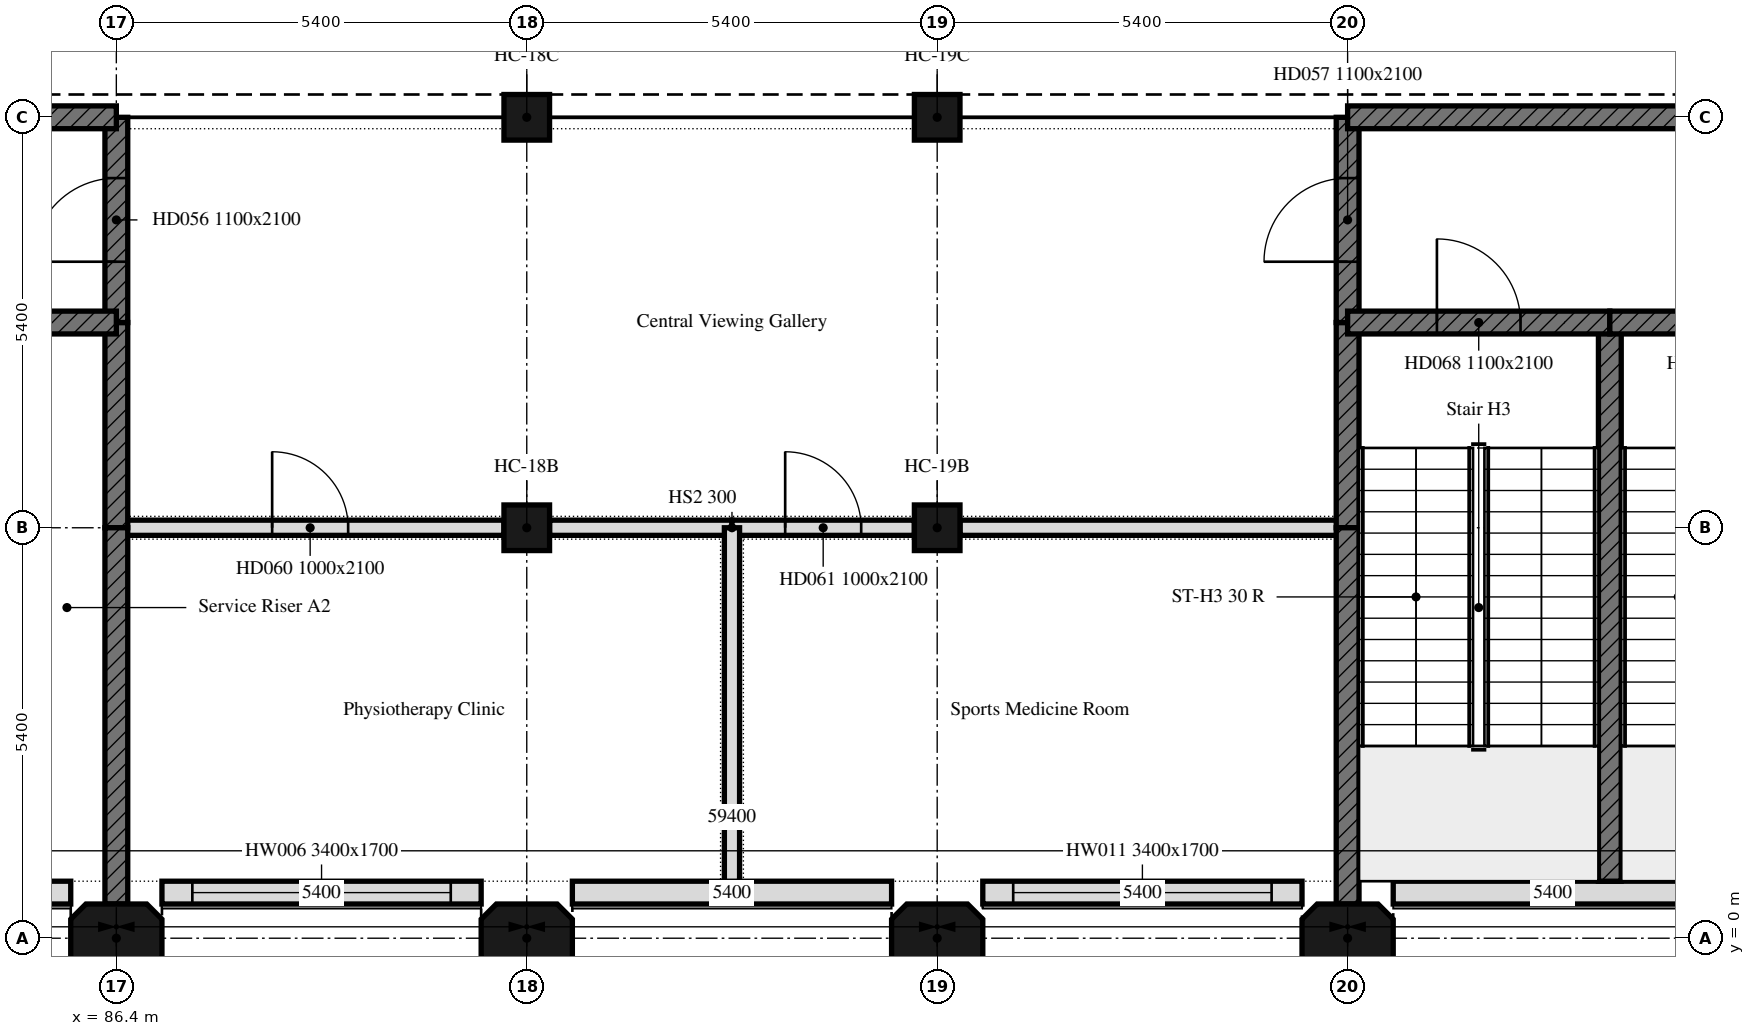
"""IFC4 building model, lengths in metres.
Left out: names, types, materials, properties, quantities, classifications, styles, units other than length and angle.
Written with IfcOpenShell. Run it as: python <this file> out.ifc"""

import sys

from ifc_helpers import new_model, si_unit, direction, frame, frame_2d, origin, origin_2d, place, context, subcontext, project, spatial, polyline, rectangle, outline, extrude, element, fill, save


model = new_model("IFC4")
c1 = context("Model", 3, precision=1e-05, world=origin(), true_north=direction((0.0, 1.0)))
c2 = subcontext(c1, "Body", "Model", "MODEL_VIEW")
j1 = project(units=[si_unit("LENGTHUNIT", "METRE"), si_unit("PLANEANGLEUNIT", "RADIAN")], contexts=[c1])
p1 = place(None, origin())
s1 = spatial("IfcSite", under=j1, at=p1, CompositionType="ELEMENT")
p2 = place(p1, origin())
s2 = spatial("IfcBuilding", under=s1, at=p2, CompositionType="ELEMENT")
p3 = place(p2, frame((0.0, 0.0, 14.4)))
s3 = spatial("IfcBuildingStorey", under=s2, at=p3, CompositionType="ELEMENT", Elevation=14.4)
for number, where, z_axis, x_axis in (
    (1, (86.4, 0.0, 0.0), (0.0, 0.0, 1.0), (1.0, 0.0, 0.0)),
    (2, (91.8, 0.0, 0.0), (0.0, 0.0, 1.0), (1.0, 0.0, 0.0)),
):
    element("IfcColumn", number, at=place(p3, frame(where, z_axis=z_axis, x_axis=x_axis)), inside=s3, PredefinedType="COLUMN", context=c2, shape_type="SweptSolid", body=[
        extrude(outline(polyline([(-0.4, -0.45), (0.4, -0.45), (0.6, -0.25), (0.6, 0.25), (0.4, 0.45), (-0.4, 0.45), (-0.6, 0.25), (-0.6, -0.25), (-0.4, -0.45)])), origin(), (0.0, 0.0, 1.0), 5.1),
    ])
for number, where, z_axis, x_axis in (
    (3, (91.8, 5.4, 0.0), (0.0, 0.0, 1.0), (1.0, 0.0, 0.0)),
    (4, (91.8, 10.8, 0.0), (0.0, 0.0, 1.0), (1.0, 0.0, 0.0)),
):
    element("IfcColumn", number, at=place(p3, frame(where, z_axis=z_axis, x_axis=x_axis)), inside=s3, PredefinedType="COLUMN", context=c2, shape_type="SweptSolid", body=[
        extrude(rectangle(XDim=0.6, YDim=0.6, at=origin_2d()), origin(), (0.0, 0.0, 1.0), 5.1),
    ])
p4 = place(p3, frame((97.2, 0.0, 0.0), z_axis=(0.0, 0.0, 1.0), x_axis=(1.0, 0.0, 0.0)))
e5 = element("IfcColumn", 5, at=p4, inside=s3, PredefinedType="COLUMN", context=c2, shape_type="SweptSolid", body=[
    extrude(outline(polyline([(-0.4, -0.45), (0.4, -0.45), (0.6, -0.25), (0.6, 0.25), (0.4, 0.45), (-0.4, 0.45), (-0.6, 0.25), (-0.6, -0.25), (-0.4, -0.45)])), origin(), (0.0, 0.0, 1.0), 5.1),
])
for number, where, z_axis, x_axis in (
    (6, (97.2, 5.4, 0.0), (0.0, 0.0, 1.0), (1.0, 0.0, 0.0)),
    (7, (97.2, 10.8, 0.0), (0.0, 0.0, 1.0), (1.0, 0.0, 0.0)),
):
    element("IfcColumn", number, at=place(p3, frame(where, z_axis=z_axis, x_axis=x_axis)), inside=s3, PredefinedType="COLUMN", context=c2, shape_type="SweptSolid", body=[
        extrude(rectangle(XDim=0.6, YDim=0.6, at=origin_2d()), origin(), (0.0, 0.0, 1.0), 5.1),
    ])
p5 = place(p3, frame((102.6, 0.0, 0.0), z_axis=(0.0, 0.0, 1.0), x_axis=(1.0, 0.0, 0.0)))
e8 = element("IfcColumn", 8, at=p5, inside=s3, PredefinedType="COLUMN", context=c2, shape_type="SweptSolid", body=[
    extrude(outline(polyline([(-0.4, -0.45), (0.4, -0.45), (0.6, -0.25), (0.6, 0.25), (0.4, 0.45), (-0.4, 0.45), (-0.6, 0.25), (-0.6, -0.25), (-0.4, -0.45)])), origin(), (0.0, 0.0, 1.0), 5.1),
])
p6 = place(p3, frame((81.6, 0.6, 0.0), z_axis=(0.0, 0.0, 1.0), x_axis=(1.0, 0.0, 0.0)))
e9 = element("IfcWall", 9, at=p6, inside=s3, PredefinedType="SOLIDWALL", context=c2, shape_type="SweptSolid", body=[
    extrude(rectangle(XDim=4.2, YDim=0.3, at=frame_2d((2.1, 0.0))), origin(), (0.0, 0.0, 1.0), 5.1),
])
p7 = place(p3, frame((87.0, 0.6, 0.0), z_axis=(0.0, 0.0, 1.0), x_axis=(1.0, 0.0, 0.0)))
e10 = element("IfcWall", 10, at=p7, inside=s3, PredefinedType="SOLIDWALL", context=c2, shape_type="SweptSolid", body=[
    extrude(rectangle(XDim=4.2, YDim=0.3, at=frame_2d((2.1, 0.0))), origin(), (0.0, 0.0, 1.0), 5.1),
])
p8 = place(p7, frame((0.4, 0.0, 0.9)))
e11 = element("IfcOpeningElement", 11, at=p8, cuts=e10, PredefinedType="OPENING", context=c2, shape_type="SweptSolid", body=[
    extrude(rectangle(XDim=3.4, YDim=1.7, at=frame_2d((1.7, 0.85))), frame((0.0, 0.15, 0.0), z_axis=(0.0, -1.0, 0.0), x_axis=(1.0, 0.0, 0.0)), (0.0, 0.0, 1.0), 0.3),
])
p9 = place(p3, frame((92.4, 0.6, 0.0), z_axis=(0.0, 0.0, 1.0), x_axis=(1.0, 0.0, 0.0)))
e12 = element("IfcWall", 12, at=p9, inside=s3, PredefinedType="SOLIDWALL", context=c2, shape_type="SweptSolid", body=[
    extrude(rectangle(XDim=4.2, YDim=0.3, at=frame_2d((2.1, 0.0))), origin(), (0.0, 0.0, 1.0), 5.1),
])
p10 = place(p3, frame((97.8, 0.6, 0.0), z_axis=(0.0, 0.0, 1.0), x_axis=(1.0, 0.0, 0.0)))
e13 = element("IfcWall", 13, at=p10, inside=s3, PredefinedType="SOLIDWALL", context=c2, shape_type="SweptSolid", body=[
    extrude(rectangle(XDim=4.2, YDim=0.3, at=frame_2d((2.1, 0.0))), origin(), (0.0, 0.0, 1.0), 5.1),
])
p11 = place(p10, frame((0.4, 0.0, 0.9)))
e14 = element("IfcOpeningElement", 14, at=p11, cuts=e13, PredefinedType="OPENING", context=c2, shape_type="SweptSolid", body=[
    extrude(rectangle(XDim=3.4, YDim=1.7, at=frame_2d((1.7, 0.85))), frame((0.0, 0.15, 0.0), z_axis=(0.0, -1.0, 0.0), x_axis=(1.0, 0.0, 0.0)), (0.0, 0.0, 1.0), 0.3),
])
p12 = place(p3, frame((103.2, 0.6, 0.0), z_axis=(0.0, 0.0, 1.0), x_axis=(1.0, 0.0, 0.0)))
e15 = element("IfcWall", 15, at=p12, inside=s3, PredefinedType="SOLIDWALL", context=c2, shape_type="SweptSolid", body=[
    extrude(rectangle(XDim=4.2, YDim=0.3, at=frame_2d((2.1, 0.0))), origin(), (0.0, 0.0, 1.0), 5.1),
])
p13 = place(p3, frame((86.4, 5.4, 0.0), z_axis=(0.0, 0.0, 1.0), x_axis=(1.0, 0.0, 0.0)))
e16 = element("IfcWall", 16, at=p13, inside=s3, PredefinedType="PARTITIONING", context=c2, shape_type="SweptSolid", body=[
    extrude(rectangle(XDim=5.1, YDim=0.2, at=frame_2d((2.55, 0.0))), origin(), (0.0, 0.0, 1.0), 5.1),
])
p14 = place(p13, frame((2.05, 0.0, 0.0)))
e17 = element("IfcOpeningElement", 17, at=p14, cuts=e16, PredefinedType="OPENING", context=c2, shape_type="SweptSolid", body=[
    extrude(rectangle(XDim=1.0, YDim=2.1, at=frame_2d((0.5, 1.05))), frame((0.0, 0.1, 0.0), z_axis=(0.0, -1.0, 0.0), x_axis=(1.0, 0.0, 0.0)), (0.0, 0.0, 1.0), 0.2),
])
p15 = place(p3, frame((92.1, 5.4, 0.0), z_axis=(0.0, 0.0, 1.0), x_axis=(1.0, 0.0, 0.0)))
e18 = element("IfcWall", 18, at=p15, inside=s3, PredefinedType="PARTITIONING", context=c2, shape_type="SweptSolid", body=[
    extrude(rectangle(XDim=2.4, YDim=0.2, at=frame_2d((1.2, 0.0))), origin(), (0.0, 0.0, 1.0), 5.1),
])
p16 = place(p3, frame((94.5, 5.4, 0.0), z_axis=(0.0, 0.0, 1.0), x_axis=(1.0, 0.0, 0.0)))
e19 = element("IfcWall", 19, at=p16, inside=s3, PredefinedType="PARTITIONING", context=c2, shape_type="SweptSolid", body=[
    extrude(rectangle(XDim=2.4, YDim=0.2, at=frame_2d((1.2, 0.0))), origin(), (0.0, 0.0, 1.0), 5.1),
])
p17 = place(p16, frame((0.7, 0.0, 0.0)))
e20 = element("IfcOpeningElement", 20, at=p17, cuts=e19, PredefinedType="OPENING", context=c2, shape_type="SweptSolid", body=[
    extrude(rectangle(XDim=1.0, YDim=2.1, at=frame_2d((0.5, 1.05))), frame((0.0, 0.1, 0.0), z_axis=(0.0, -1.0, 0.0), x_axis=(1.0, 0.0, 0.0)), (0.0, 0.0, 1.0), 0.2),
])
p18 = place(p3, frame((97.5, 5.4, 0.0), z_axis=(0.0, 0.0, 1.0), x_axis=(1.0, 0.0, 0.0)))
e21 = element("IfcWall", 21, at=p18, inside=s3, PredefinedType="PARTITIONING", context=c2, shape_type="SweptSolid", body=[
    extrude(rectangle(XDim=5.1, YDim=0.2, at=frame_2d((2.55, 0.0))), origin(), (0.0, 0.0, 1.0), 5.1),
])
p19 = place(p3, frame((86.4, 5.4, 0.0), z_axis=(0.0, 0.0, 1.0), x_axis=(0.0, 1.0, 0.0)))
e22 = element("IfcWall", 22, at=p19, inside=s3, PredefinedType="SHEAR", context=c2, shape_type="SweptSolid", body=[
    extrude(rectangle(XDim=2.7, YDim=0.3, at=frame_2d((1.35, 0.0))), origin(), (0.0, 0.0, 1.0), 5.1),
])
p20 = place(p3, frame((86.4, 8.1, 0.0), z_axis=(0.0, 0.0, 1.0), x_axis=(0.0, 1.0, 0.0)))
e23 = element("IfcWall", 23, at=p20, inside=s3, PredefinedType="SHEAR", context=c2, shape_type="SweptSolid", body=[
    extrude(rectangle(XDim=2.7, YDim=0.3, at=frame_2d((1.35, 0.0))), origin(), (0.0, 0.0, 1.0), 5.1),
])
p21 = place(p20, frame((0.8, 0.0, 0.0)))
e24 = element("IfcOpeningElement", 24, at=p21, cuts=e23, PredefinedType="OPENING", context=c2, shape_type="SweptSolid", body=[
    extrude(rectangle(XDim=1.1, YDim=2.1, at=frame_2d((0.55, 1.05))), frame((0.0, 0.15, 0.0), z_axis=(0.0, -1.0, 0.0), x_axis=(1.0, 0.0, 0.0)), (0.0, 0.0, 1.0), 0.3),
])
p22 = place(p3, frame((102.6, 5.4, 0.0), z_axis=(0.0, 0.0, 1.0), x_axis=(0.0, 1.0, 0.0)))
e25 = element("IfcWall", 25, at=p22, inside=s3, PredefinedType="SHEAR", context=c2, shape_type="SweptSolid", body=[
    extrude(rectangle(XDim=2.7, YDim=0.3, at=frame_2d((1.35, 0.0))), origin(), (0.0, 0.0, 1.0), 5.1),
])
p23 = place(p3, frame((102.6, 8.1, 0.0), z_axis=(0.0, 0.0, 1.0), x_axis=(0.0, 1.0, 0.0)))
e26 = element("IfcWall", 26, at=p23, inside=s3, PredefinedType="SHEAR", context=c2, shape_type="SweptSolid", body=[
    extrude(rectangle(XDim=2.7, YDim=0.3, at=frame_2d((1.35, 0.0))), origin(), (0.0, 0.0, 1.0), 5.1),
])
p24 = place(p23, frame((0.8, 0.0, 0.0)))
e27 = element("IfcOpeningElement", 27, at=p24, cuts=e26, PredefinedType="OPENING", context=c2, shape_type="SweptSolid", body=[
    extrude(rectangle(XDim=1.1, YDim=2.1, at=frame_2d((0.55, 1.05))), frame((0.0, 0.15, 0.0), z_axis=(0.0, -1.0, 0.0), x_axis=(1.0, 0.0, 0.0)), (0.0, 0.0, 1.0), 0.3),
])
p25 = place(p3, frame((94.5, 0.75, 0.0), z_axis=(0.0, 0.0, 1.0), x_axis=(0.0, 1.0, 0.0)))
e28 = element("IfcWall", 28, at=p25, inside=s3, PredefinedType="PARTITIONING", context=c2, shape_type="SweptSolid", body=[
    extrude(rectangle(XDim=4.65, YDim=0.2, at=frame_2d((2.325, 0.0))), origin(), (0.0, 0.0, 1.0), 5.1),
])
for number, where, z_axis, x_axis in (
    (29, (86.4, 0.45, 0.0), (0.0, 0.0, 1.0), (0.0, 1.0, 0.0)),
    (30, (102.6, 0.45, 0.0), (0.0, 0.0, 1.0), (0.0, 1.0, 0.0)),
):
    element("IfcWall", number, at=place(p3, frame(where, z_axis=z_axis, x_axis=x_axis)), inside=s3, PredefinedType="SHEAR", context=c2, shape_type="SweptSolid", body=[
        extrude(rectangle(XDim=4.95, YDim=0.3, at=frame_2d((2.475, 0.0))), origin(), (0.0, 0.0, 1.0), 5.1),
    ])
p26 = place(p3, frame((85.1, 8.1, 0.0), z_axis=(0.0, 0.0, 1.0), x_axis=(1.0, 0.0, 0.0)))
e31 = element("IfcWall", 31, at=p26, inside=s3, PredefinedType="SHEAR", context=c2, shape_type="SweptSolid", body=[
    extrude(rectangle(XDim=1.3, YDim=0.3, at=frame_2d((0.65, 0.0))), origin(), (0.0, 0.0, 1.0), 5.1),
])
p27 = place(p3, frame((81.0, 10.8, 0.0), z_axis=(0.0, 0.0, 1.0), x_axis=(1.0, 0.0, 0.0)))
e32 = element("IfcWall", 32, at=p27, inside=s3, PredefinedType="SHEAR", context=c2, shape_type="SweptSolid", body=[
    extrude(rectangle(XDim=5.4, YDim=0.3, at=frame_2d((2.7, 0.0))), origin(), (0.0, 0.0, 1.0), 5.1),
])
p28 = place(p3, frame((106.05, 0.75, 0.0), z_axis=(0.0, 0.0, 1.0), x_axis=(0.0, 1.0, 0.0)))
e33 = element("IfcWall", 33, at=p28, inside=s3, PredefinedType="SHEAR", context=c2, shape_type="SweptSolid", body=[
    extrude(rectangle(XDim=7.35, YDim=0.3, at=frame_2d((3.675, 0.0))), origin(), (0.0, 0.0, 1.0), 5.1),
])
p29 = place(p3, frame((102.6, 8.1, 0.0), z_axis=(0.0, 0.0, 1.0), x_axis=(1.0, 0.0, 0.0)))
e34 = element("IfcWall", 34, at=p29, inside=s3, PredefinedType="SHEAR", context=c2, shape_type="SweptSolid", body=[
    extrude(rectangle(XDim=3.45, YDim=0.3, at=frame_2d((1.725, 0.0))), origin(), (0.0, 0.0, 1.0), 5.1),
])
p30 = place(p29, frame((1.175, 0.0, 0.0)))
e35 = element("IfcOpeningElement", 35, at=p30, cuts=e34, PredefinedType="OPENING", context=c2, shape_type="SweptSolid", body=[
    extrude(rectangle(XDim=1.1, YDim=2.1, at=frame_2d((0.55, 1.05))), frame((0.0, 0.15, 0.0), z_axis=(0.0, -1.0, 0.0), x_axis=(1.0, 0.0, 0.0)), (0.0, 0.0, 1.0), 0.3),
])
p31 = place(p3, frame((106.05, 8.1, 0.0), z_axis=(0.0, 0.0, 1.0), x_axis=(1.0, 0.0, 0.0)))
e36 = element("IfcWall", 36, at=p31, inside=s3, PredefinedType="SHEAR", context=c2, shape_type="SweptSolid", body=[
    extrude(rectangle(XDim=3.45, YDim=0.3, at=frame_2d((1.725, 0.0))), origin(), (0.0, 0.0, 1.0), 5.1),
])
p32 = place(p31, frame((1.175, 0.0, 0.0)))
e37 = element("IfcOpeningElement", 37, at=p32, cuts=e36, PredefinedType="OPENING", context=c2, shape_type="SweptSolid", body=[
    extrude(rectangle(XDim=1.1, YDim=2.1, at=frame_2d((0.55, 1.05))), frame((0.0, 0.15, 0.0), z_axis=(0.0, -1.0, 0.0), x_axis=(1.0, 0.0, 0.0)), (0.0, 0.0, 1.0), 0.3),
])
p33 = place(p3, frame((102.6, 10.8, 0.0), z_axis=(0.0, 0.0, 1.0), x_axis=(1.0, 0.0, 0.0)))
e38 = element("IfcWall", 38, at=p33, inside=s3, PredefinedType="SHEAR", context=c2, shape_type="SweptSolid", body=[
    extrude(rectangle(XDim=10.8, YDim=0.3, at=frame_2d((5.4, 0.0))), origin(), (0.0, 0.0, 1.0), 5.1),
])
p34 = place(p8, origin())
e39 = element("IfcWindow", 39, at=p34, inside=s3, PartitioningType="SINGLE_PANEL", PredefinedType="WINDOW", context=c2, shape_type="SweptSolid", body=[
    extrude(rectangle(XDim=3.4, YDim=1.7, at=frame_2d((1.7, 0.85))), frame((0.0, 0.03, 0.0), z_axis=(0.0, -1.0, 0.0), x_axis=(1.0, 0.0, 0.0)), (0.0, 0.0, 1.0), 0.06),
])
fill(e11, e39)
p35 = place(p11, origin())
e40 = element("IfcWindow", 40, at=p35, inside=s3, PartitioningType="SINGLE_PANEL", PredefinedType="WINDOW", context=c2, shape_type="SweptSolid", body=[
    extrude(rectangle(XDim=3.4, YDim=1.7, at=frame_2d((1.7, 0.85))), frame((0.0, 0.03, 0.0), z_axis=(0.0, -1.0, 0.0), x_axis=(1.0, 0.0, 0.0)), (0.0, 0.0, 1.0), 0.06),
])
fill(e14, e40)
p36 = place(p21, origin())
e41 = element("IfcDoor", 41, at=p36, inside=s3, OperationType="SINGLE_SWING_LEFT", PredefinedType="DOOR", context=c2, shape_type="SweptSolid", body=[
    extrude(rectangle(XDim=1.1, YDim=2.1, at=frame_2d((0.55, 1.05))), frame((0.0, 0.025, 0.0), z_axis=(0.0, -1.0, 0.0), x_axis=(1.0, 0.0, 0.0)), (0.0, 0.0, 1.0), 0.05),
])
fill(e24, e41)
p37 = place(p24, origin())
e42 = element("IfcDoor", 42, at=p37, inside=s3, OperationType="SINGLE_SWING_LEFT", PredefinedType="DOOR", context=c2, shape_type="SweptSolid", body=[
    extrude(rectangle(XDim=1.1, YDim=2.1, at=frame_2d((0.55, 1.05))), frame((0.0, 0.025, 0.0), z_axis=(0.0, -1.0, 0.0), x_axis=(1.0, 0.0, 0.0)), (0.0, 0.0, 1.0), 0.05),
])
fill(e27, e42)
p38 = place(p14, origin())
e43 = element("IfcDoor", 43, at=p38, inside=s3, OperationType="SINGLE_SWING_LEFT", PredefinedType="DOOR", context=c2, shape_type="SweptSolid", body=[
    extrude(rectangle(XDim=1.0, YDim=2.1, at=frame_2d((0.5, 1.05))), frame((0.0, 0.025, 0.0), z_axis=(0.0, -1.0, 0.0), x_axis=(1.0, 0.0, 0.0)), (0.0, 0.0, 1.0), 0.05),
])
fill(e17, e43)
p39 = place(p17, origin())
e44 = element("IfcDoor", 44, at=p39, inside=s3, OperationType="SINGLE_SWING_LEFT", PredefinedType="DOOR", context=c2, shape_type="SweptSolid", body=[
    extrude(rectangle(XDim=1.0, YDim=2.1, at=frame_2d((0.5, 1.05))), frame((0.0, 0.025, 0.0), z_axis=(0.0, -1.0, 0.0), x_axis=(1.0, 0.0, 0.0)), (0.0, 0.0, 1.0), 0.05),
])
fill(e20, e44)
p40 = place(p30, origin())
e45 = element("IfcDoor", 45, at=p40, inside=s3, OperationType="SINGLE_SWING_LEFT", PredefinedType="DOOR", context=c2, shape_type="SweptSolid", body=[
    extrude(rectangle(XDim=1.1, YDim=2.1, at=frame_2d((0.55, 1.05))), frame((0.0, 0.025, 0.0), z_axis=(0.0, -1.0, 0.0), x_axis=(1.0, 0.0, 0.0)), (0.0, 0.0, 1.0), 0.05),
])
fill(e35, e45)
save(model, sys.argv[1])
